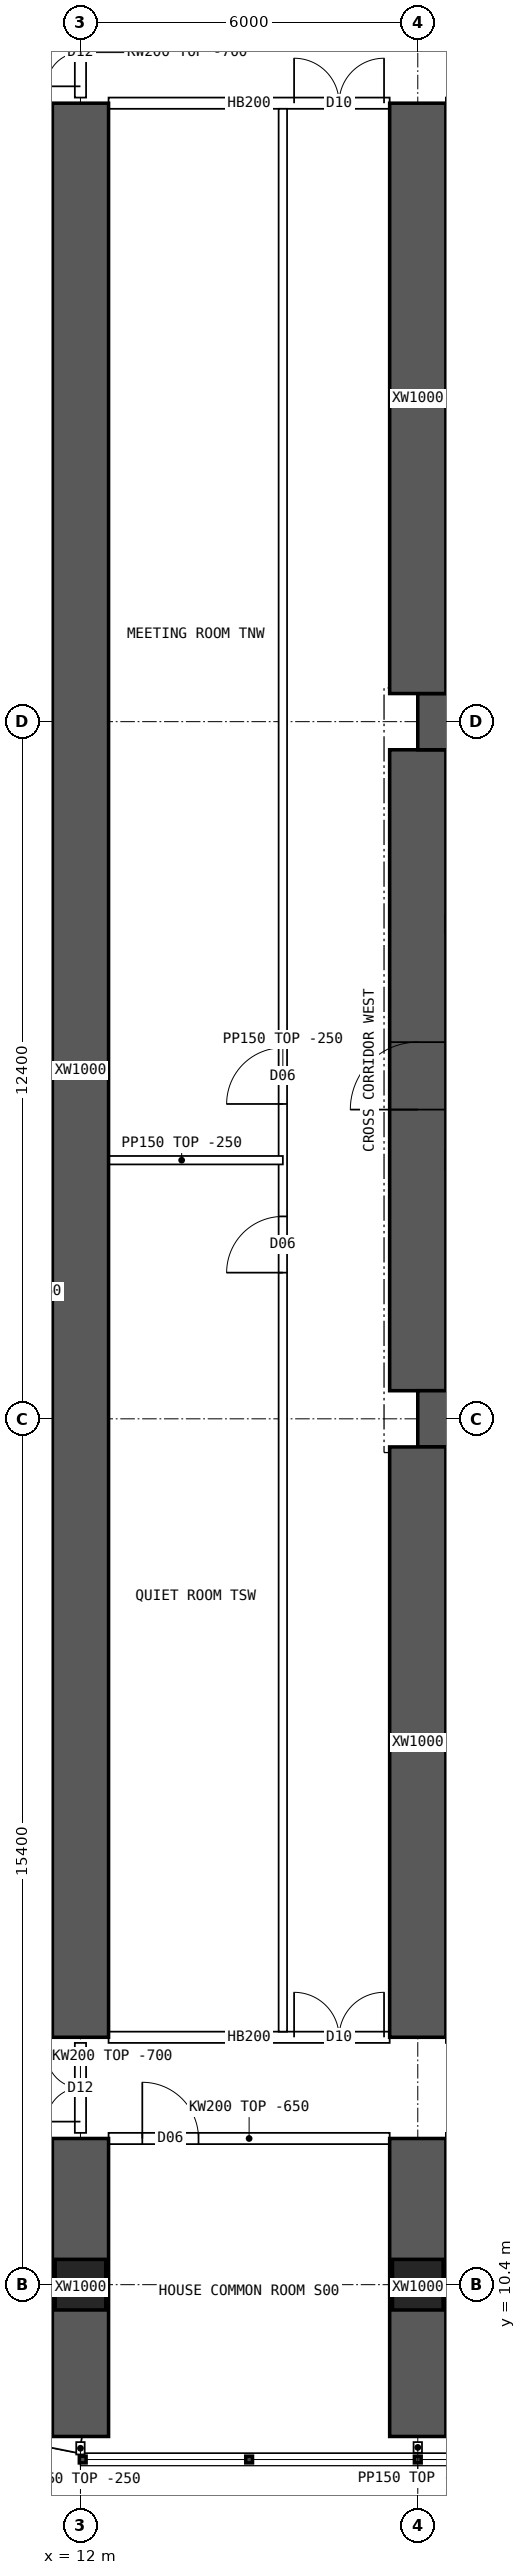
"""IFC4 building model, lengths in metres.
Left out: names, types, materials, properties, quantities, classifications, styles, units other than length and angle.
Written with IfcOpenShell. Run it as: python <this file> out.ifc"""

import sys

from ifc_helpers import new_model, si_unit, direction, frame, frame_2d, origin, origin_2d, place, context, subcontext, project, spatial, polyline, rectangle, hollow_rectangle, outline, extrude, element, fill, save


model = new_model("IFC4")
c1 = context("Model", 3, precision=1e-05, world=origin(), true_north=direction((0.0, 1.0)))
c2 = subcontext(c1, "Body", "Model", "MODEL_VIEW")
j1 = project(units=[si_unit("LENGTHUNIT", "METRE"), si_unit("PLANEANGLEUNIT", "RADIAN")], contexts=[c1])
p1 = place(None, origin())
s1 = spatial("IfcSite", under=j1, at=p1, CompositionType="ELEMENT")
p2 = place(p1, origin())
s2 = spatial("IfcBuilding", under=s1, at=p2, CompositionType="ELEMENT")
p3 = place(p2, frame((0.0, 0.0, 53.95)))
s3 = spatial("IfcBuildingStorey", under=s2, at=p3, CompositionType="ELEMENT", Elevation=53.95)
for number, where, z_axis, x_axis in (
    (1, (12.0, 10.4, 0.0), (0.0, 0.0, 1.0), (1.0, 0.0, 0.0)),
    (2, (18.0, 10.4, 0.0), (0.0, 0.0, 1.0), (1.0, 0.0, 0.0)),
):
    element("IfcColumn", number, at=place(p3, frame(where, z_axis=z_axis, x_axis=x_axis)), inside=s3, PredefinedType="COLUMN", context=c2, shape_type="SweptSolid", body=[
        extrude(hollow_rectangle(XDim=0.9, YDim=0.9, WallThickness=0.09, at=origin_2d()), origin(), (0.0, 0.0, 1.0), 3.75),
    ])
for number, where, z_axis, x_axis in (
    (3, (18.0, 25.8, 0.0), (0.0, 0.0, 1.0), (1.0, 0.0, 0.0)),
    (4, (18.0, 38.2, 0.0), (0.0, 0.0, 1.0), (1.0, 0.0, 0.0)),
):
    element("IfcWall", number, at=place(p3, frame(where, z_axis=z_axis, x_axis=x_axis)), inside=s3, PredefinedType="SHEAR", context=c2, shape_type="SweptSolid", body=[
        extrude(rectangle(XDim=48.0, YDim=1.0, at=frame_2d((24.0, 0.0))), origin(), (0.0, 0.0, 1.0), 3.75),
    ])
p4 = place(p3, frame((18.0, 26.3, 0.0), z_axis=(0.0, 0.0, 1.0), x_axis=(0.0, 1.0, 0.0)))
e5 = element("IfcWall", 5, at=p4, inside=s3, PredefinedType="SHEAR", context=c2, shape_type="SweptSolid", body=[
    extrude(rectangle(XDim=11.4, YDim=1.0, at=frame_2d((5.7, 0.0))), origin(), (0.0, 0.0, 1.0), 3.75),
])
p5 = place(p4, frame((5.0, 0.0, 0.0)))
e6 = element("IfcOpeningElement", 6, at=p5, cuts=e5, PredefinedType="OPENING", context=c2, shape_type="SweptSolid", body=[
    extrude(rectangle(XDim=1.2, YDim=2.1, at=frame_2d((0.6, 1.05))), frame((0.0, 0.51, 0.0), z_axis=(0.0, -1.0, 0.0), x_axis=(1.0, 0.0, 0.0)), (0.0, 0.0, 1.0), 1.02),
])
p6 = place(p3, frame((12.0, 7.7, 0.0), z_axis=(0.0, 0.0, 1.0), x_axis=(0.0, 1.0, 0.0)))
e7 = element("IfcWall", 7, at=p6, inside=s3, PredefinedType="SHEAR", context=c2, shape_type="SweptSolid", body=[
    extrude(rectangle(XDim=5.3, YDim=1.0, at=frame_2d((2.65, 0.0))), origin(), (0.0, 0.0, 1.0), 3.75),
])
p7 = place(p3, frame((12.0, 14.8, 0.0), z_axis=(0.0, 0.0, 1.0), x_axis=(0.0, 1.0, 0.0)))
e8 = element("IfcWall", 8, at=p7, inside=s3, PredefinedType="SHEAR", context=c2, shape_type="SweptSolid", body=[
    extrude(rectangle(XDim=34.4, YDim=1.0, at=frame_2d((17.2, 0.0))), origin(), (0.0, 0.0, 1.0), 3.75),
])
p8 = place(p3, frame((18.0, 7.7, 0.0), z_axis=(0.0, 0.0, 1.0), x_axis=(0.0, 1.0, 0.0)))
e9 = element("IfcWall", 9, at=p8, inside=s3, PredefinedType="SHEAR", context=c2, shape_type="SweptSolid", body=[
    extrude(rectangle(XDim=5.3, YDim=1.0, at=frame_2d((2.65, 0.0))), origin(), (0.0, 0.0, 1.0), 3.75),
])
for number, where, z_axis, x_axis in (
    (10, (18.0, 14.8, 0.0), (0.0, 0.0, 1.0), (0.0, 1.0, 0.0)),
    (11, (18.0, 38.7, 0.0), (0.0, 0.0, 1.0), (0.0, 1.0, 0.0)),
):
    element("IfcWall", number, at=place(p3, frame(where, z_axis=z_axis, x_axis=x_axis)), inside=s3, PredefinedType="SHEAR", context=c2, shape_type="SweptSolid", body=[
        extrude(rectangle(XDim=10.5, YDim=1.0, at=frame_2d((5.25, 0.0))), origin(), (0.0, 0.0, 1.0), 3.75),
    ])
p9 = place(p3, frame((8.843, 8.178, 0.0), z_axis=(0.0, 0.0, 1.0), x_axis=(0.980787251524, -0.195080412259, 0.0)))
e12 = element("IfcWall", 12, at=p9, inside=s3, PredefinedType="SOLIDWALL", context=c2, shape_type="SweptSolid", body=[
    extrude(outline(polyline([(-0.03, -0.15), (3.249, -0.15), (3.189, 0.15), (0.03, 0.15), (-0.03, -0.15)])), origin(), (0.0, 0.0, 1.0), 3.5),
])
p10 = place(p9, frame((0.909, 0.0, 0.9)))
e13 = element("IfcOpeningElement", 13, at=p10, cuts=e12, PredefinedType="OPENING", context=c2, shape_type="SweptSolid", body=[
    extrude(rectangle(XDim=1.4, YDim=1.8, at=frame_2d((0.7, 0.9))), frame((0.0, 0.16, 0.0), z_axis=(0.0, -1.0, 0.0), x_axis=(1.0, 0.0, 0.0)), (0.0, 0.0, 1.0), 0.32),
])
p11 = place(p3, frame((12.5, 13.0, 0.0), z_axis=(0.0, 0.0, 1.0), x_axis=(1.0, 0.0, 0.0)))
e14 = element("IfcWall", 14, at=p11, inside=s3, PredefinedType="SOLIDWALL", context=c2, shape_type="SweptSolid", body=[
    extrude(outline(polyline([(0.0, 0.0), (5.0, 0.0), (5.0, 3.1), (0.0, 3.1), (0.0, 0.0)])), frame((0.0, 0.1, 0.0), z_axis=(0.0, -1.0, 0.0), x_axis=(1.0, 0.0, 0.0)), (0.0, 0.0, 1.0), 0.2),
])
p12 = place(p11, frame((0.6, 0.0, 0.0)))
e15 = element("IfcOpeningElement", 15, at=p12, cuts=e14, PredefinedType="OPENING", context=c2, shape_type="SweptSolid", body=[
    extrude(rectangle(XDim=1.0, YDim=2.1, at=frame_2d((0.5, 1.05))), frame((0.0, 0.11, 0.0), z_axis=(0.0, -1.0, 0.0), x_axis=(1.0, 0.0, 0.0)), (0.0, 0.0, 1.0), 0.22),
])
p13 = place(p3, frame((12.5, 14.8, 0.0), z_axis=(0.0, 0.0, 1.0), x_axis=(1.0, 0.0, 0.0)))
e16 = element("IfcWall", 16, at=p13, inside=s3, PredefinedType="SOLIDWALL", context=c2, shape_type="SweptSolid", body=[
    extrude(rectangle(XDim=5.0, YDim=0.2, at=frame_2d((2.5, 0.0))), origin(), (0.0, 0.0, 1.0), 3.5),
])
p14 = place(p13, frame((3.3, 0.0, 0.0)))
e17 = element("IfcOpeningElement", 17, at=p14, cuts=e16, PredefinedType="OPENING", context=c2, shape_type="SweptSolid", body=[
    extrude(rectangle(XDim=1.6, YDim=2.1, at=frame_2d((0.8, 1.05))), frame((0.0, 0.11, 0.0), z_axis=(0.0, -1.0, 0.0), x_axis=(1.0, 0.0, 0.0)), (0.0, 0.0, 1.0), 0.22),
])
p15 = place(p3, frame((12.5, 49.2, 0.0), z_axis=(0.0, 0.0, 1.0), x_axis=(1.0, 0.0, 0.0)))
e18 = element("IfcWall", 18, at=p15, inside=s3, PredefinedType="SOLIDWALL", context=c2, shape_type="SweptSolid", body=[
    extrude(rectangle(XDim=5.0, YDim=0.2, at=frame_2d((2.5, 0.0))), origin(), (0.0, 0.0, 1.0), 3.5),
])
p16 = place(p15, frame((3.3, 0.0, 0.0)))
e19 = element("IfcOpeningElement", 19, at=p16, cuts=e18, PredefinedType="OPENING", context=c2, shape_type="SweptSolid", body=[
    extrude(rectangle(XDim=1.6, YDim=2.1, at=frame_2d((0.8, 1.05))), frame((0.0, 0.11, 0.0), z_axis=(0.0, -1.0, 0.0), x_axis=(1.0, 0.0, 0.0)), (0.0, 0.0, 1.0), 0.22),
])
p17 = place(p3, frame((15.6, 14.9, 0.0), z_axis=(0.0, 0.0, 1.0), x_axis=(0.0, 1.0, 0.0)))
e20 = element("IfcWall", 20, at=p17, inside=s3, PredefinedType="PARTITIONING", context=c2, shape_type="SweptSolid", body=[
    extrude(rectangle(XDim=34.2, YDim=0.15, at=frame_2d((17.1, 0.0))), origin(), (0.0, 0.0, 1.0), 3.5),
])
p18 = place(p17, frame((13.5, 0.0, 0.0)))
e21 = element("IfcOpeningElement", 21, at=p18, cuts=e20, PredefinedType="OPENING", context=c2, shape_type="SweptSolid", body=[
    extrude(rectangle(XDim=1.0, YDim=2.1, at=frame_2d((0.5, 1.05))), frame((0.0, 0.085, 0.0), z_axis=(0.0, -1.0, 0.0), x_axis=(1.0, 0.0, 0.0)), (0.0, 0.0, 1.0), 0.17),
])
p19 = place(p17, frame((16.5, 0.0, 0.0)))
e22 = element("IfcOpeningElement", 22, at=p19, cuts=e20, PredefinedType="OPENING", context=c2, shape_type="SweptSolid", body=[
    extrude(rectangle(XDim=1.0, YDim=2.1, at=frame_2d((0.5, 1.05))), frame((0.0, 0.085, 0.0), z_axis=(0.0, -1.0, 0.0), x_axis=(1.0, 0.0, 0.0)), (0.0, 0.0, 1.0), 0.17),
])
p20 = place(p3, frame((12.0, 30.4, 0.0), z_axis=(0.0, 0.0, 1.0), x_axis=(1.0, 0.0, 0.0)))
e23 = element("IfcWall", 23, at=p20, inside=s3, PredefinedType="PARTITIONING", context=c2, shape_type="SweptSolid", body=[
    extrude(rectangle(XDim=3.6, YDim=0.15, at=frame_2d((1.8, 0.0))), origin(), (0.0, 0.0, 1.0), 3.5),
])
p21 = place(p3, frame((3.905, 30.85, 0.0), z_axis=(0.0, 0.0, 1.0), x_axis=(1.0, 0.0, 0.0)))
e24 = element("IfcWall", 24, at=p21, inside=s3, PredefinedType="PARTITIONING", context=c2, shape_type="SweptSolid", body=[
    extrude(outline(polyline([(0.0, 0.0), (8.02, 0.0), (8.02, 3.5), (2.397, 3.5), (2.395, 3.05), (1.797, 3.05), (1.795, 3.5), (0.0, 3.5), (0.0, 0.0)])), frame((0.0, 0.075, 0.0), z_axis=(0.0, -1.0, 0.0), x_axis=(1.0, 0.0, 0.0)), (0.0, 0.0, 1.0), 0.15),
])
p22 = place(p3, frame((12.0, 13.1, 0.0), z_axis=(0.0, 0.0, 1.0), x_axis=(0.0, 1.0, 0.0)))
e25 = element("IfcWall", 25, at=p22, inside=s3, PredefinedType="SOLIDWALL", context=c2, shape_type="SweptSolid", body=[
    extrude(outline(polyline([(0.0, 0.0), (1.6, 0.0), (1.6, 3.05), (0.0, 3.05), (0.0, 0.0)])), frame((0.0, 0.1, 0.0), z_axis=(0.0, -1.0, 0.0), x_axis=(1.0, 0.0, 0.0)), (0.0, 0.0, 1.0), 0.2),
])
p23 = place(p22, frame((0.2, 0.0, 0.0)))
e26 = element("IfcOpeningElement", 26, at=p23, cuts=e25, PredefinedType="OPENING", context=c2, shape_type="SweptSolid", body=[
    extrude(rectangle(XDim=1.2, YDim=2.1, at=frame_2d((0.6, 1.05))), frame((0.0, 0.11, 0.0), z_axis=(0.0, -1.0, 0.0), x_axis=(1.0, 0.0, 0.0)), (0.0, 0.0, 1.0), 0.22),
])
p24 = place(p3, frame((12.0, 49.3, 0.0), z_axis=(0.0, 0.0, 1.0), x_axis=(0.0, 1.0, 0.0)))
e27 = element("IfcWall", 27, at=p24, inside=s3, PredefinedType="SOLIDWALL", context=c2, shape_type="SweptSolid", body=[
    extrude(outline(polyline([(0.0, 0.0), (1.6, 0.0), (1.6, 3.05), (0.0, 3.05), (0.0, 0.0)])), frame((0.0, 0.1, 0.0), z_axis=(0.0, -1.0, 0.0), x_axis=(1.0, 0.0, 0.0)), (0.0, 0.0, 1.0), 0.2),
])
p25 = place(p24, frame((0.2, 0.0, 0.0)))
e28 = element("IfcOpeningElement", 28, at=p25, cuts=e27, PredefinedType="OPENING", context=c2, shape_type="SweptSolid", body=[
    extrude(rectangle(XDim=1.2, YDim=2.1, at=frame_2d((0.6, 1.05))), frame((0.0, 0.11, 0.0), z_axis=(0.0, -1.0, 0.0), x_axis=(1.0, 0.0, 0.0)), (0.0, 0.0, 1.0), 0.22),
])
p26 = place(p3, frame((12.0, 7.6, 0.0), z_axis=(0.0, 0.0, 1.0), x_axis=(0.0, -1.0, 0.0)))
e29 = element("IfcWall", 29, at=p26, inside=s3, PredefinedType="PARTITIONING", context=c2, shape_type="SweptSolid", body=[
    extrude(rectangle(XDim=0.22, YDim=0.15, at=frame_2d((0.11, 0.0))), origin(), (0.0, 0.0, 1.0), 3.5),
])
p27 = place(p3, frame((18.0, 7.6, 0.0), z_axis=(0.0, 0.0, 1.0), x_axis=(0.0, -1.0, 0.0)))
e30 = element("IfcWall", 30, at=p27, inside=s3, PredefinedType="PARTITIONING", context=c2, shape_type="SweptSolid", body=[
    extrude(rectangle(XDim=0.19, YDim=0.15, at=frame_2d((0.095, 0.0))), origin(), (0.0, 0.0, 1.0), 3.5),
])
p28 = place(p5, origin())
e31 = element("IfcDoor", 31, at=p28, inside=s3, OperationType="SINGLE_SWING_LEFT", PredefinedType="DOOR", context=c2, shape_type="SweptSolid", body=[
    extrude(rectangle(XDim=1.2, YDim=2.1, at=frame_2d((0.6, 1.05))), frame((0.0, 0.025, 0.0), z_axis=(0.0, -1.0, 0.0), x_axis=(1.0, 0.0, 0.0)), (0.0, 0.0, 1.0), 0.05),
])
fill(e6, e31)
p29 = place(p14, origin())
e32 = element("IfcDoor", 32, at=p29, inside=s3, OperationType="DOUBLE_DOOR_SINGLE_SWING", PredefinedType="DOOR", context=c2, shape_type="SweptSolid", body=[
    extrude(rectangle(XDim=1.6, YDim=2.1, at=frame_2d((0.8, 1.05))), frame((0.0, 0.025, 0.0), z_axis=(0.0, -1.0, 0.0), x_axis=(1.0, 0.0, 0.0)), (0.0, 0.0, 1.0), 0.05),
])
fill(e17, e32)
p30 = place(p16, origin())
e33 = element("IfcDoor", 33, at=p30, inside=s3, OperationType="DOUBLE_DOOR_SINGLE_SWING", PredefinedType="DOOR", context=c2, shape_type="SweptSolid", body=[
    extrude(rectangle(XDim=1.6, YDim=2.1, at=frame_2d((0.8, 1.05))), frame((0.0, 0.025, 0.0), z_axis=(0.0, -1.0, 0.0), x_axis=(1.0, 0.0, 0.0)), (0.0, 0.0, 1.0), 0.05),
])
fill(e19, e33)
p31 = place(p12, origin())
e34 = element("IfcDoor", 34, at=p31, inside=s3, OperationType="SINGLE_SWING_LEFT", PredefinedType="DOOR", context=c2, shape_type="SweptSolid", body=[
    extrude(rectangle(XDim=1.0, YDim=2.1, at=frame_2d((0.5, 1.05))), frame((0.0, 0.025, 0.0), z_axis=(0.0, -1.0, 0.0), x_axis=(1.0, 0.0, 0.0)), (0.0, 0.0, 1.0), 0.05),
])
fill(e15, e34)
p32 = place(p18, origin())
e35 = element("IfcDoor", 35, at=p32, inside=s3, OperationType="SINGLE_SWING_LEFT", PredefinedType="DOOR", context=c2, shape_type="SweptSolid", body=[
    extrude(rectangle(XDim=1.0, YDim=2.1, at=frame_2d((0.5, 1.05))), frame((0.0, 0.025, 0.0), z_axis=(0.0, -1.0, 0.0), x_axis=(1.0, 0.0, 0.0)), (0.0, 0.0, 1.0), 0.05),
])
fill(e21, e35)
p33 = place(p19, origin())
e36 = element("IfcDoor", 36, at=p33, inside=s3, OperationType="SINGLE_SWING_LEFT", PredefinedType="DOOR", context=c2, shape_type="SweptSolid", body=[
    extrude(rectangle(XDim=1.0, YDim=2.1, at=frame_2d((0.5, 1.05))), frame((0.0, 0.025, 0.0), z_axis=(0.0, -1.0, 0.0), x_axis=(1.0, 0.0, 0.0)), (0.0, 0.0, 1.0), 0.05),
])
fill(e22, e36)
p34 = place(p23, origin())
e37 = element("IfcDoor", 37, at=p34, inside=s3, OperationType="DOUBLE_DOOR_SINGLE_SWING", PredefinedType="DOOR", context=c2, shape_type="SweptSolid", body=[
    extrude(rectangle(XDim=1.2, YDim=2.1, at=frame_2d((0.6, 1.05))), frame((0.0, 0.025, 0.0), z_axis=(0.0, -1.0, 0.0), x_axis=(1.0, 0.0, 0.0)), (0.0, 0.0, 1.0), 0.05),
])
fill(e26, e37)
p35 = place(p25, origin())
e38 = element("IfcDoor", 38, at=p35, inside=s3, OperationType="DOUBLE_DOOR_SINGLE_SWING", PredefinedType="DOOR", context=c2, shape_type="SweptSolid", body=[
    extrude(rectangle(XDim=1.2, YDim=2.1, at=frame_2d((0.6, 1.05))), frame((0.0, 0.025, 0.0), z_axis=(0.0, -1.0, 0.0), x_axis=(1.0, 0.0, 0.0)), (0.0, 0.0, 1.0), 0.05),
])
fill(e28, e38)
save(model, sys.argv[1])
